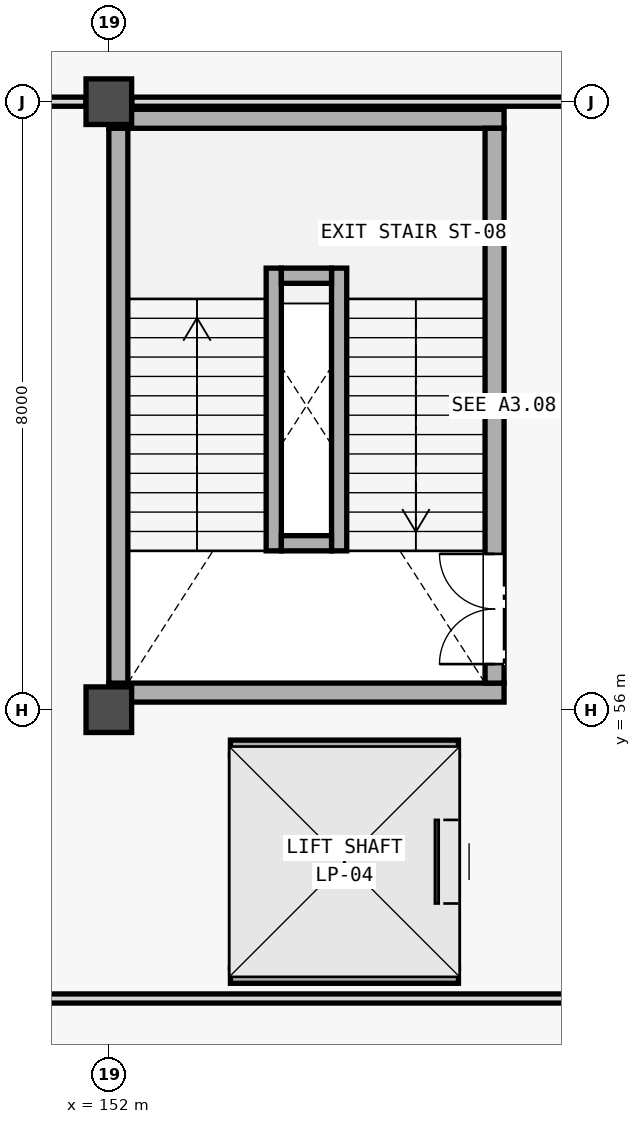
"""IFC4 building model, lengths in metres.
Left out: names, types, materials, properties, quantities, classifications, styles, units other than length and angle.
Written with IfcOpenShell. Run it as: python <this file> out.ifc"""

import sys

from ifc_helpers import new_model, si_unit, direction, frame, frame_2d, origin, origin_2d, place, context, subcontext, project, spatial, rectangle, extrude, element, fill, save


model = new_model("IFC4")
c1 = context("Model", 3, precision=1e-05, world=origin(), true_north=direction((0.0, 1.0)))
c2 = subcontext(c1, "Body", "Model", "MODEL_VIEW")
j1 = project(units=[si_unit("LENGTHUNIT", "METRE"), si_unit("PLANEANGLEUNIT", "RADIAN")], contexts=[c1])
p1 = place(None, origin())
s1 = spatial("IfcSite", under=j1, at=p1, CompositionType="ELEMENT")
p2 = place(p1, origin())
s2 = spatial("IfcBuilding", under=s1, at=p2, CompositionType="ELEMENT")
p3 = place(p2, frame((0.0, 0.0, 10.2)))
s3 = spatial("IfcBuildingStorey", under=s2, at=p3, CompositionType="ELEMENT", Elevation=10.2)
for number, where, z_axis, x_axis in (
    (1, (152.0, 56.0, 0.0), (0.0, 0.0, 1.0), (1.0, 0.0, 0.0)),
    (2, (152.0, 64.0, 0.0), (0.0, 0.0, 1.0), (1.0, 0.0, 0.0)),
):
    element("IfcColumn", number, at=place(p3, frame(where, z_axis=z_axis, x_axis=x_axis)), inside=s3, PredefinedType="COLUMN", context=c2, shape_type="SweptSolid", body=[
        extrude(rectangle(XDim=0.6, YDim=0.6, at=origin_2d()), origin(), (0.0, 0.0, 1.0), 3.96),
    ])
for number, where, z_axis, x_axis in (
    (3, (152.0, 56.225, 0.0), (0.0, 0.0, 1.0), (1.0, 0.0, 0.0)),
    (4, (152.0, 63.775, 0.0), (0.0, 0.0, 1.0), (1.0, 0.0, 0.0)),
):
    element("IfcWall", number, at=place(p3, frame(where, z_axis=z_axis, x_axis=x_axis)), inside=s3, PredefinedType="SHEAR", context=c2, shape_type="SweptSolid", body=[
        extrude(rectangle(XDim=5.2, YDim=0.25, at=frame_2d((2.6, 0.0))), origin(), (0.0, 0.0, 1.0), 4.2),
    ])
p4 = place(p3, frame((152.125, 56.35, 0.0), z_axis=(0.0, 0.0, 1.0), x_axis=(0.0, 1.0, 0.0)))
e5 = element("IfcWall", 5, at=p4, inside=s3, PredefinedType="SHEAR", context=c2, shape_type="SweptSolid", body=[
    extrude(rectangle(XDim=7.3, YDim=0.25, at=frame_2d((3.65, 0.0))), origin(), (0.0, 0.0, 1.0), 4.2),
])
p5 = place(p3, frame((157.075, 56.35, 0.0), z_axis=(0.0, 0.0, 1.0), x_axis=(0.0, 1.0, 0.0)))
e6 = element("IfcWall", 6, at=p5, inside=s3, PredefinedType="SHEAR", context=c2, shape_type="SweptSolid", body=[
    extrude(rectangle(XDim=7.3, YDim=0.25, at=frame_2d((3.65, 0.0))), origin(), (0.0, 0.0, 1.0), 4.2),
])
p6 = place(p5, frame((0.25, 0.0, 0.0)))
e7 = element("IfcOpeningElement", 7, at=p6, cuts=e6, PredefinedType="OPENING", context=c2, shape_type="SweptSolid", body=[
    extrude(rectangle(XDim=1.45, YDim=2.2, at=frame_2d((0.725, 1.1))), frame((0.0, 0.135, 0.0), z_axis=(0.0, -1.0, 0.0), x_axis=(1.0, 0.0, 0.0)), (0.0, 0.0, 1.0), 0.27),
])
for number, where, z_axis, x_axis in (
    (8, (154.17, 58.09, 0.0), (0.0, 0.0, 1.0), (0.0, 1.0, 0.0)),
    (9, (155.03, 58.09, 0.0), (0.0, 0.0, 1.0), (0.0, 1.0, 0.0)),
):
    element("IfcWall", number, at=place(p3, frame(where, z_axis=z_axis, x_axis=x_axis)), inside=s3, PredefinedType="SHEAR", context=c2, shape_type="SweptSolid", body=[
        extrude(rectangle(XDim=3.72, YDim=0.2, at=frame_2d((1.86, 0.0))), origin(), (0.0, 0.0, 1.0), 4.2),
    ])
for number, where, z_axis, x_axis in (
    (10, (154.27, 58.19, 0.0), (0.0, 0.0, 1.0), (1.0, 0.0, 0.0)),
    (11, (154.27, 61.71, 0.0), (0.0, 0.0, 1.0), (1.0, 0.0, 0.0)),
):
    element("IfcWall", number, at=place(p3, frame(where, z_axis=z_axis, x_axis=x_axis)), inside=s3, PredefinedType="SHEAR", context=c2, shape_type="SweptSolid", body=[
        extrude(rectangle(XDim=0.66, YDim=0.2, at=frame_2d((0.33, 0.0))), origin(), (0.0, 0.0, 1.0), 4.2),
    ])
for number, where, z_axis, x_axis in (
    (12, (153.6, 52.5, 0.0), (0.0, 0.0, 1.0), (1.0, 0.0, 0.0)),
    (13, (153.6, 55.5, 0.0), (0.0, 0.0, 1.0), (1.0, 0.0, 0.0)),
):
    element("IfcWall", number, at=place(p3, frame(where, z_axis=z_axis, x_axis=x_axis)), inside=s3, PredefinedType="SHEAR", context=c2, shape_type="SweptSolid", body=[
        extrude(rectangle(XDim=3.0, YDim=0.2, at=frame_2d((1.5, 0.0))), origin(), (0.0, 0.0, 1.0), 4.2),
    ])
p7 = place(p3, frame((153.7, 52.6, 0.0), z_axis=(0.0, 0.0, 1.0), x_axis=(0.0, 1.0, 0.0)))
e14 = element("IfcWall", 14, at=p7, inside=s3, PredefinedType="SHEAR", context=c2, shape_type="SweptSolid", body=[
    extrude(rectangle(XDim=2.8, YDim=0.2, at=frame_2d((1.4, 0.0))), origin(), (0.0, 0.0, 1.0), 4.2),
])
p8 = place(p3, frame((156.5, 52.6, 0.0), z_axis=(0.0, 0.0, 1.0), x_axis=(0.0, 1.0, 0.0)))
e15 = element("IfcWall", 15, at=p8, inside=s3, PredefinedType="SHEAR", context=c2, shape_type="SweptSolid", body=[
    extrude(rectangle(XDim=2.8, YDim=0.2, at=frame_2d((1.4, 0.0))), origin(), (0.0, 0.0, 1.0), 4.2),
])
p9 = place(p8, frame((0.85, 0.0, 0.0)))
e16 = element("IfcOpeningElement", 16, at=p9, cuts=e15, PredefinedType="OPENING", context=c2, shape_type="SweptSolid", body=[
    extrude(rectangle(XDim=1.1, YDim=2.2, at=frame_2d((0.55, 1.1))), frame((0.0, 0.11, 0.0), z_axis=(0.0, -1.0, 0.0), x_axis=(1.0, 0.0, 0.0)), (0.0, 0.0, 1.0), 0.22),
])
p10 = place(p3, frame((144.15, 52.2, 0.0), z_axis=(0.0, 0.0, 1.0), x_axis=(1.0, 0.0, 0.0)))
e17 = element("IfcWall", 17, at=p10, inside=s3, PredefinedType="PARTITIONING", context=c2, shape_type="SweptSolid", body=[
    extrude(rectangle(XDim=17.85, YDim=0.12, at=frame_2d((8.925, 0.0))), origin(), (0.0, 0.0, 1.0), 3.24),
])
p11 = place(p3, frame((144.252, 64.0, 0.0), z_axis=(0.0, 0.0, 1.0), x_axis=(1.0, 0.0, 0.0)))
e18 = element("IfcWall", 18, at=p11, inside=s3, PredefinedType="PARTITIONING", context=c2, shape_type="SweptSolid", body=[
    extrude(rectangle(XDim=7.446, YDim=0.12, at=frame_2d((3.723, 0.0))), origin(), (0.0, 0.0, 1.0), 3.39),
])
p12 = place(p3, frame((152.302, 64.0, 0.0), z_axis=(0.0, 0.0, 1.0), x_axis=(1.0, 0.0, 0.0)))
e19 = element("IfcWall", 19, at=p12, inside=s3, PredefinedType="PARTITIONING", context=c2, shape_type="SweptSolid", body=[
    extrude(rectangle(XDim=9.396, YDim=0.12, at=frame_2d((4.698, 0.0))), origin(), (0.0, 0.0, 1.0), 3.24),
])
p13 = place(p6, origin())
e20 = element("IfcDoor", 20, at=p13, inside=s3, OperationType="DOUBLE_DOOR_SINGLE_SWING", PredefinedType="DOOR", context=c2, shape_type="SweptSolid", body=[
    extrude(rectangle(XDim=1.45, YDim=2.2, at=frame_2d((0.725, 1.1))), frame((0.0, 0.025, 0.0), z_axis=(0.0, -1.0, 0.0), x_axis=(1.0, 0.0, 0.0)), (0.0, 0.0, 1.0), 0.05),
])
fill(e7, e20)
p14 = place(p9, origin())
e21 = element("IfcDoor", 21, at=p14, inside=s3, OperationType="SLIDING_TO_LEFT", PredefinedType="DOOR", context=c2, shape_type="SweptSolid", body=[
    extrude(rectangle(XDim=1.1, YDim=2.2, at=frame_2d((0.55, 1.1))), frame((0.0, 0.025, 0.0), z_axis=(0.0, -1.0, 0.0), x_axis=(1.0, 0.0, 0.0)), (0.0, 0.0, 1.0), 0.05),
])
fill(e16, e21)
save(model, sys.argv[1])
